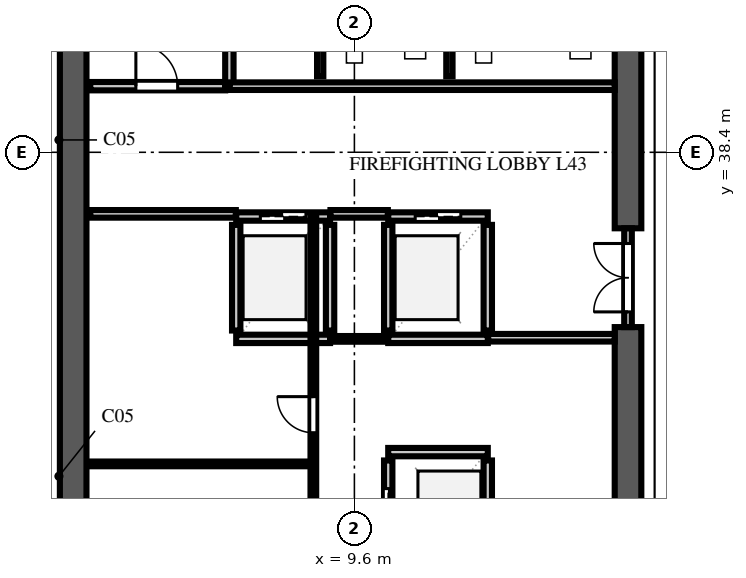
"""IFC4 building model, lengths in metres.
Left out: names, types, materials, properties, quantities, classifications, styles, units other than length and angle.
Written with IfcOpenShell. Run it as: python <this file> out.ifc"""

import sys

from ifc_helpers import new_model, si_unit, direction, frame, frame_2d, origin, place, context, subcontext, project, spatial, rectangle, extrude, element, fill, save


model = new_model("IFC4")
c1 = context("Model", 3, precision=1e-05, world=origin(), true_north=direction((0.0, 1.0)))
c2 = subcontext(c1, "Body", "Model", "MODEL_VIEW")
j1 = project(units=[si_unit("LENGTHUNIT", "METRE"), si_unit("PLANEANGLEUNIT", "RADIAN")], contexts=[c1])
p1 = place(None, origin())
s1 = spatial("IfcSite", under=j1, at=p1, CompositionType="ELEMENT")
p2 = place(p1, origin())
s2 = spatial("IfcBuilding", under=s1, at=p2, CompositionType="ELEMENT")
p3 = place(p2, frame((0.0, 0.0, 171.2)))
s3 = spatial("IfcBuildingStorey", under=s2, at=p3, CompositionType="ELEMENT", Elevation=171.2)
p4 = place(p3, frame((2.2, 9.25, 0.0), z_axis=(0.0, 0.0, 1.0), x_axis=(0.0, 1.0, 0.0)))
e1 = element("IfcWall", 1, at=p4, inside=s3, PredefinedType="SHEAR", context=c2, shape_type="SweptSolid", body=[
    extrude(rectangle(XDim=39.1, YDim=0.7, at=frame_2d((19.55, 0.0))), origin(), (0.0, 0.0, 1.0), 3.54),
])
p5 = place(p3, frame((16.8, 26.0, 0.0), z_axis=(0.0, 0.0, 1.0), x_axis=(0.0, 1.0, 0.0)))
e2 = element("IfcWall", 2, at=p5, inside=s3, PredefinedType="SHEAR", context=c2, shape_type="SweptSolid", body=[
    extrude(rectangle(XDim=7.8, YDim=0.7, at=frame_2d((3.9, 0.0))), origin(), (0.0, 0.0, 1.0), 3.54),
])
p6 = place(p3, frame((16.8, 36.4, 0.0), z_axis=(0.0, 0.0, 1.0), x_axis=(0.0, 1.0, 0.0)))
e3 = element("IfcWall", 3, at=p6, inside=s3, PredefinedType="SHEAR", context=c2, shape_type="SweptSolid", body=[
    extrude(rectangle(XDim=11.25, YDim=0.7, at=frame_2d((5.625, 0.0))), origin(), (0.0, 0.0, 1.0), 3.54),
])
p7 = place(p6, frame((9.2, 0.0, 0.0)))
e4 = element("IfcOpeningElement", 4, at=p7, cuts=e3, PredefinedType="OPENING", context=c2, shape_type="SweptSolid", body=[
    extrude(rectangle(XDim=0.95, YDim=2.15, at=frame_2d((0.475, 1.075))), frame((0.0, 0.362, 0.0), z_axis=(0.0, -1.0, 0.0), x_axis=(1.0, 0.0, 0.0)), (0.0, 0.0, 1.0), 0.724),
])
p8 = place(p3, frame((2.65, 40.14, 0.0), z_axis=(0.0, 0.0, 1.0), x_axis=(1.0, 0.0, 0.0)))
e5 = element("IfcWall", 5, at=p8, inside=s3, PredefinedType="SOLIDWALL", context=c2, shape_type="SweptSolid", body=[
    extrude(rectangle(XDim=3.55, YDim=0.22, at=frame_2d((1.775, 0.0))), origin(), (0.0, 0.0, 1.0), 3.54),
])
p9 = place(p8, frame((1.2, 0.0, 0.0)))
e6 = element("IfcOpeningElement", 6, at=p9, cuts=e5, PredefinedType="OPENING", context=c2, shape_type="SweptSolid", body=[
    extrude(rectangle(XDim=1.1, YDim=2.2, at=frame_2d((0.55, 1.1))), frame((0.0, 0.122, 0.0), z_axis=(0.0, -1.0, 0.0), x_axis=(1.0, 0.0, 0.0)), (0.0, 0.0, 1.0), 0.244),
])
p10 = place(p3, frame((6.31, 40.14, 0.0), z_axis=(0.0, 0.0, 1.0), x_axis=(0.0, 1.0, 0.0)))
e7 = element("IfcWall", 7, at=p10, inside=s3, PredefinedType="SOLIDWALL", context=c2, shape_type="SweptSolid", body=[
    extrude(rectangle(XDim=7.81, YDim=0.22, at=frame_2d((3.905, 0.0))), origin(), (0.0, 0.0, 1.0), 3.54),
])
p11 = place(p3, frame((10.49, 27.71, 0.0), z_axis=(0.0, 0.0, 1.0), x_axis=(0.0, 1.0, 0.0)))
e8 = element("IfcWall", 8, at=p11, inside=s3, PredefinedType="SOLIDWALL", context=c2, shape_type="SweptSolid", body=[
    extrude(rectangle(XDim=2.58, YDim=0.22, at=frame_2d((1.29, 0.0))), origin(), (0.0, 0.0, 1.0), 3.54),
])
p12 = place(p11, frame((0.74, 0.0, 0.0)))
e9 = element("IfcOpeningElement", 9, at=p12, cuts=e8, PredefinedType="OPENING", context=c2, shape_type="SweptSolid", body=[
    extrude(rectangle(XDim=1.1, YDim=2.2, at=frame_2d((0.55, 1.1))), frame((0.0, 0.122, 0.0), z_axis=(0.0, -1.0, 0.0), x_axis=(1.0, 0.0, 0.0)), (0.0, 0.0, 1.0), 0.244),
])
p13 = place(p3, frame((13.11, 27.71, 0.0), z_axis=(0.0, 0.0, 1.0), x_axis=(0.0, 1.0, 0.0)))
e10 = element("IfcWall", 10, at=p13, inside=s3, PredefinedType="SOLIDWALL", context=c2, shape_type="SweptSolid", body=[
    extrude(rectangle(XDim=2.58, YDim=0.22, at=frame_2d((1.29, 0.0))), origin(), (0.0, 0.0, 1.0), 3.54),
])
p14 = place(p3, frame((10.49, 30.51, 0.0), z_axis=(0.0, 0.0, 1.0), x_axis=(1.0, 0.0, 0.0)))
e11 = element("IfcWall", 11, at=p14, inside=s3, PredefinedType="SOLIDWALL", context=c2, shape_type="SweptSolid", body=[
    extrude(rectangle(XDim=2.62, YDim=0.22, at=frame_2d((1.31, 0.0))), origin(), (0.0, 0.0, 1.0), 3.54),
])
for number, where, z_axis, x_axis in (
    (12, (6.49, 33.71, 0.0), (0.0, 0.0, 1.0), (0.0, 1.0, 0.0)),
    (13, (8.96, 33.71, 0.0), (0.0, 0.0, 1.0), (0.0, 1.0, 0.0)),
):
    element("IfcWall", number, at=place(p3, frame(where, z_axis=z_axis, x_axis=x_axis)), inside=s3, PredefinedType="SOLIDWALL", context=c2, shape_type="SweptSolid", body=[
        extrude(rectangle(XDim=2.78, YDim=0.22, at=frame_2d((1.39, 0.0))), origin(), (0.0, 0.0, 1.0), 3.54),
    ])
p15 = place(p3, frame((6.49, 33.49, 0.0), z_axis=(0.0, 0.0, 1.0), x_axis=(1.0, 0.0, 0.0)))
e14 = element("IfcWall", 14, at=p15, inside=s3, PredefinedType="SOLIDWALL", context=c2, shape_type="SweptSolid", body=[
    extrude(rectangle(XDim=2.47, YDim=0.22, at=frame_2d((1.235, 0.0))), origin(), (0.0, 0.0, 1.0), 3.54),
])
p16 = place(p3, frame((6.49, 36.71, 0.0), z_axis=(0.0, 0.0, 1.0), x_axis=(1.0, 0.0, 0.0)))
e15 = element("IfcWall", 15, at=p16, inside=s3, PredefinedType="SOLIDWALL", context=c2, shape_type="SweptSolid", body=[
    extrude(rectangle(XDim=2.47, YDim=0.22, at=frame_2d((1.235, 0.0))), origin(), (0.0, 0.0, 1.0), 3.54),
])
p17 = place(p16, frame((0.635, 0.0, 0.0)))
e16 = element("IfcOpeningElement", 16, at=p17, cuts=e15, PredefinedType="OPENING", context=c2, shape_type="SweptSolid", body=[
    extrude(rectangle(XDim=1.2, YDim=2.2, at=frame_2d((0.6, 1.1))), frame((0.0, 0.122, 0.0), z_axis=(0.0, -1.0, 0.0), x_axis=(1.0, 0.0, 0.0)), (0.0, 0.0, 1.0), 0.244),
])
for number, where, z_axis, x_axis in (
    (17, (10.49, 33.71, 0.0), (0.0, 0.0, 1.0), (0.0, 1.0, 0.0)),
    (18, (13.11, 33.71, 0.0), (0.0, 0.0, 1.0), (0.0, 1.0, 0.0)),
):
    element("IfcWall", number, at=place(p3, frame(where, z_axis=z_axis, x_axis=x_axis)), inside=s3, PredefinedType="SOLIDWALL", context=c2, shape_type="SweptSolid", body=[
        extrude(rectangle(XDim=2.78, YDim=0.22, at=frame_2d((1.39, 0.0))), origin(), (0.0, 0.0, 1.0), 3.54),
    ])
p18 = place(p3, frame((10.49, 33.49, 0.0), z_axis=(0.0, 0.0, 1.0), x_axis=(1.0, 0.0, 0.0)))
e19 = element("IfcWall", 19, at=p18, inside=s3, PredefinedType="SOLIDWALL", context=c2, shape_type="SweptSolid", body=[
    extrude(rectangle(XDim=2.62, YDim=0.22, at=frame_2d((1.31, 0.0))), origin(), (0.0, 0.0, 1.0), 3.54),
])
p19 = place(p3, frame((10.49, 36.71, 0.0), z_axis=(0.0, 0.0, 1.0), x_axis=(1.0, 0.0, 0.0)))
e20 = element("IfcWall", 20, at=p19, inside=s3, PredefinedType="SOLIDWALL", context=c2, shape_type="SweptSolid", body=[
    extrude(rectangle(XDim=2.62, YDim=0.22, at=frame_2d((1.31, 0.0))), origin(), (0.0, 0.0, 1.0), 3.54),
])
p20 = place(p19, frame((0.71, 0.0, 0.0)))
e21 = element("IfcOpeningElement", 21, at=p20, cuts=e20, PredefinedType="OPENING", context=c2, shape_type="SweptSolid", body=[
    extrude(rectangle(XDim=1.2, YDim=2.2, at=frame_2d((0.6, 1.1))), frame((0.0, 0.122, 0.0), z_axis=(0.0, -1.0, 0.0), x_axis=(1.0, 0.0, 0.0)), (0.0, 0.0, 1.0), 0.244),
])
p21 = place(p3, frame((2.65, 36.78, 0.0), z_axis=(0.0, 0.0, 1.0), x_axis=(1.0, 0.0, 0.0)))
e22 = element("IfcWall", 22, at=p21, inside=s3, PredefinedType="SOLIDWALL", context=c2, shape_type="SweptSolid", body=[
    extrude(rectangle(XDim=3.83, YDim=0.2, at=frame_2d((1.915, 0.0))), origin(), (0.0, 0.0, 1.0), 3.54),
])
p22 = place(p3, frame((8.97, 36.78, 0.0), z_axis=(0.0, 0.0, 1.0), x_axis=(1.0, 0.0, 0.0)))
e23 = element("IfcWall", 23, at=p22, inside=s3, PredefinedType="SOLIDWALL", context=c2, shape_type="SweptSolid", body=[
    extrude(rectangle(XDim=1.51, YDim=0.2, at=frame_2d((0.755, 0.0))), origin(), (0.0, 0.0, 1.0), 3.54),
])
p23 = place(p3, frame((13.12, 33.52, 0.0), z_axis=(0.0, 0.0, 1.0), x_axis=(1.0, 0.0, 0.0)))
e24 = element("IfcWall", 24, at=p23, inside=s3, PredefinedType="SOLIDWALL", context=c2, shape_type="SweptSolid", body=[
    extrude(rectangle(XDim=3.33, YDim=0.2, at=frame_2d((1.665, 0.0))), origin(), (0.0, 0.0, 1.0), 3.54),
])
p24 = place(p3, frame((6.32, 40.14, 0.0), z_axis=(0.0, 0.0, 1.0), x_axis=(1.0, 0.0, 0.0)))
e25 = element("IfcWall", 25, at=p24, inside=s3, PredefinedType="SOLIDWALL", context=c2, shape_type="SweptSolid", body=[
    extrude(rectangle(XDim=10.13, YDim=0.2, at=frame_2d((5.065, 0.0))), origin(), (0.0, 0.0, 1.0), 3.54),
])
p25 = place(p3, frame((16.8, 33.8, 0.0), z_axis=(0.0, 0.0, 1.0), x_axis=(0.0, 1.0, 0.0)))
e26 = element("IfcWall", 26, at=p25, inside=s3, PredefinedType="SOLIDWALL", context=c2, shape_type="SweptSolid", body=[
    extrude(rectangle(XDim=2.6, YDim=0.2, at=frame_2d((1.3, 0.0))), origin(), (0.0, 0.0, 1.0), 3.54),
])
p26 = place(p25, frame((0.4, 0.0, 0.0)))
e27 = element("IfcOpeningElement", 27, at=p26, cuts=e26, PredefinedType="OPENING", context=c2, shape_type="SweptSolid", body=[
    extrude(rectangle(XDim=1.8, YDim=2.2, at=frame_2d((0.9, 1.1))), frame((0.0, 0.112, 0.0), z_axis=(0.0, -1.0, 0.0), x_axis=(1.0, 0.0, 0.0)), (0.0, 0.0, 1.0), 0.224),
])
p27 = place(p3, frame((8.965, 33.49, 0.0), z_axis=(0.0, 0.0, 1.0), x_axis=(1.0, 0.0, 0.0)))
e28 = element("IfcWall", 28, at=p27, inside=s3, PredefinedType="PARTITIONING", context=c2, shape_type="SweptSolid", body=[
    extrude(rectangle(XDim=1.52, YDim=0.15, at=frame_2d((0.76, 0.0))), origin(), (0.0, 0.0, 1.0), 3.54),
])
p28 = place(p3, frame((2.65, 30.2, 0.0), z_axis=(0.0, 0.0, 1.0), x_axis=(1.0, 0.0, 0.0)))
e29 = element("IfcWall", 29, at=p28, inside=s3, PredefinedType="PARTITIONING", context=c2, shape_type="SweptSolid", body=[
    extrude(rectangle(XDim=5.87, YDim=0.125, at=frame_2d((2.935, 0.0))), origin(), (0.0, 0.0, 1.0), 3.54),
])
p29 = place(p3, frame((8.52, 12.02, 0.0), z_axis=(0.0, 0.0, 1.0), x_axis=(0.0, 1.0, 0.0)))
e30 = element("IfcWall", 30, at=p29, inside=s3, PredefinedType="PARTITIONING", context=c2, shape_type="SweptSolid", body=[
    extrude(rectangle(XDim=24.76, YDim=0.15, at=frame_2d((12.38, 0.0))), origin(), (0.0, 0.0, 1.0), 3.54),
])
p30 = place(p29, frame((8.0, 0.0, 0.0)))
e31 = element("IfcOpeningElement", 31, at=p30, cuts=e30, PredefinedType="OPENING", context=c2, shape_type="SweptSolid", body=[
    extrude(rectangle(XDim=0.95, YDim=2.15, at=frame_2d((0.475, 1.075))), frame((0.0, 0.087, 0.0), z_axis=(0.0, -1.0, 0.0), x_axis=(1.0, 0.0, 0.0)), (0.0, 0.0, 1.0), 0.174),
])
p31 = place(p29, frame((19.0, 0.0, 0.0)))
e32 = element("IfcOpeningElement", 32, at=p31, cuts=e30, PredefinedType="OPENING", context=c2, shape_type="SweptSolid", body=[
    extrude(rectangle(XDim=0.95, YDim=2.15, at=frame_2d((0.475, 1.075))), frame((0.0, 0.087, 0.0), z_axis=(0.0, -1.0, 0.0), x_axis=(1.0, 0.0, 0.0)), (0.0, 0.0, 1.0), 0.174),
])
for number, where, z_axis, x_axis in (
    (33, (8.7, 40.4, 0.0), (0.0, 0.0, 1.0), (0.0, 1.0, 0.0)),
    (34, (12.1, 40.4, 0.0), (0.0, 0.0, 1.0), (0.0, 1.0, 0.0)),
):
    element("IfcWall", number, at=place(p3, frame(where, z_axis=z_axis, x_axis=x_axis)), inside=s3, PredefinedType="PLUMBINGWALL", context=c2, shape_type="SweptSolid", body=[
        extrude(rectangle(XDim=4.92, YDim=0.165, at=frame_2d((2.46, 0.0))), origin(), (0.0, 0.0, 1.0), 3.54),
    ])
p32 = place(p9, origin())
e35 = element("IfcDoor", 35, at=p32, inside=s3, OperationType="SINGLE_SWING_LEFT", PredefinedType="DOOR", context=c2, shape_type="SweptSolid", body=[
    extrude(rectangle(XDim=1.1, YDim=2.2, at=frame_2d((0.55, 1.1))), frame((0.0, 0.025, 0.0), z_axis=(0.0, -1.0, 0.0), x_axis=(1.0, 0.0, 0.0)), (0.0, 0.0, 1.0), 0.05),
])
fill(e6, e35)
p33 = place(p12, origin())
e36 = element("IfcDoor", 36, at=p33, inside=s3, OperationType="DOUBLE_DOOR_SLIDING", PredefinedType="DOOR", context=c2, shape_type="SweptSolid", body=[
    extrude(rectangle(XDim=1.1, YDim=2.2, at=frame_2d((0.55, 1.1))), frame((0.0, 0.025, 0.0), z_axis=(0.0, -1.0, 0.0), x_axis=(1.0, 0.0, 0.0)), (0.0, 0.0, 1.0), 0.05),
])
fill(e9, e36)
p34 = place(p17, origin())
e37 = element("IfcDoor", 37, at=p34, inside=s3, OperationType="DOUBLE_DOOR_SLIDING", PredefinedType="DOOR", context=c2, shape_type="SweptSolid", body=[
    extrude(rectangle(XDim=1.2, YDim=2.2, at=frame_2d((0.6, 1.1))), frame((0.0, 0.025, 0.0), z_axis=(0.0, -1.0, 0.0), x_axis=(1.0, 0.0, 0.0)), (0.0, 0.0, 1.0), 0.05),
])
fill(e16, e37)
p35 = place(p20, origin())
e38 = element("IfcDoor", 38, at=p35, inside=s3, OperationType="DOUBLE_DOOR_SLIDING", PredefinedType="DOOR", context=c2, shape_type="SweptSolid", body=[
    extrude(rectangle(XDim=1.2, YDim=2.2, at=frame_2d((0.6, 1.1))), frame((0.0, 0.025, 0.0), z_axis=(0.0, -1.0, 0.0), x_axis=(1.0, 0.0, 0.0)), (0.0, 0.0, 1.0), 0.05),
])
fill(e21, e38)
p36 = place(p26, origin())
e39 = element("IfcDoor", 39, at=p36, inside=s3, OperationType="DOUBLE_DOOR_SINGLE_SWING", PredefinedType="DOOR", context=c2, shape_type="SweptSolid", body=[
    extrude(rectangle(XDim=1.8, YDim=2.2, at=frame_2d((0.9, 1.1))), frame((0.0, 0.025, 0.0), z_axis=(0.0, -1.0, 0.0), x_axis=(1.0, 0.0, 0.0)), (0.0, 0.0, 1.0), 0.05),
])
fill(e27, e39)
p37 = place(p31, origin())
e40 = element("IfcDoor", 40, at=p37, inside=s3, OperationType="SINGLE_SWING_RIGHT", PredefinedType="DOOR", context=c2, shape_type="SweptSolid", body=[
    extrude(rectangle(XDim=0.95, YDim=2.15, at=frame_2d((0.475, 1.075))), frame((0.0, 0.025, 0.0), z_axis=(0.0, -1.0, 0.0), x_axis=(1.0, 0.0, 0.0)), (0.0, 0.0, 1.0), 0.05),
])
fill(e32, e40)
save(model, sys.argv[1])
